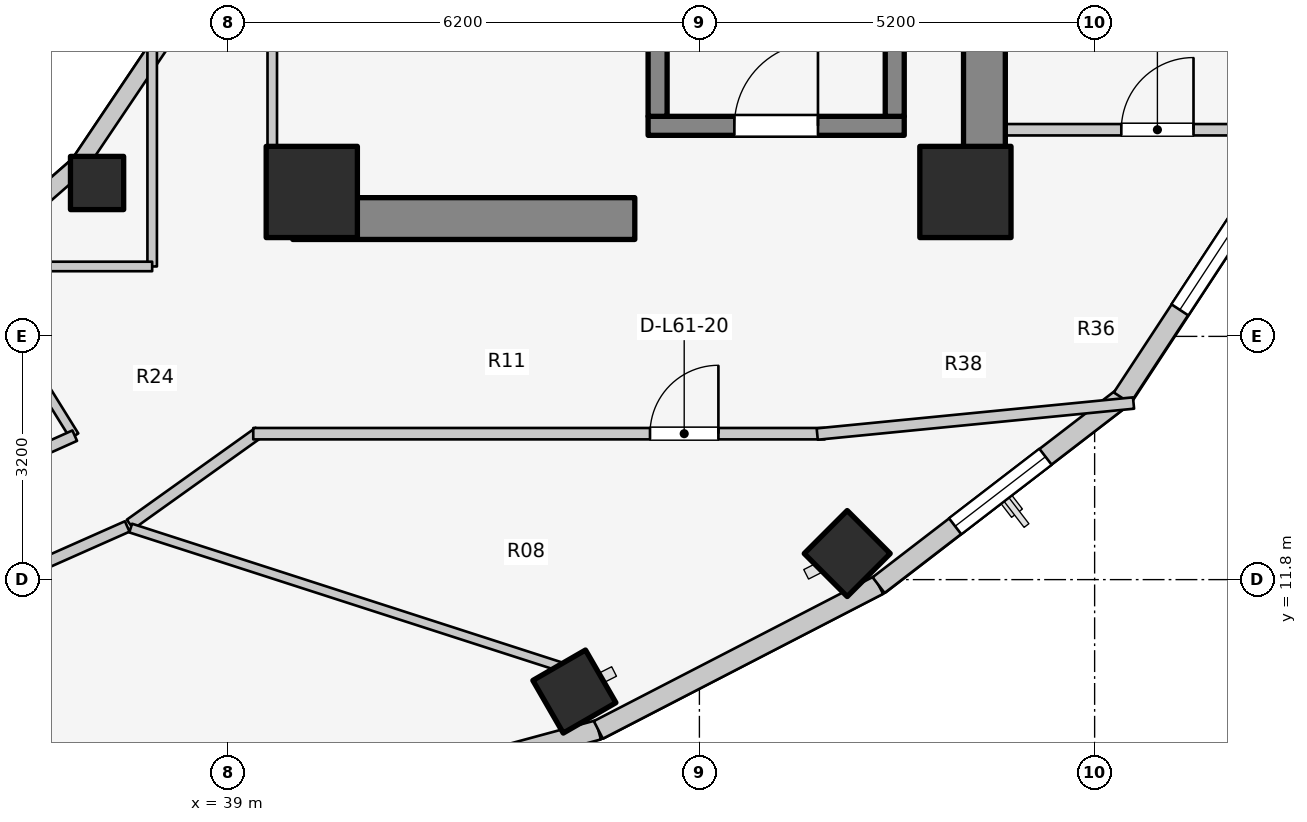
"""IFC4 building model, lengths in metres.
Left out: names, types, materials, properties, quantities, classifications, styles, units other than length and angle.
Written with IfcOpenShell. Run it as: python <this file> out.ifc"""

import sys

from ifc_helpers import new_model, si_unit, direction, frame, frame_2d, origin, origin_2d, place, context, subcontext, project, spatial, rectangle, extrude, element, fill, save


model = new_model("IFC4")
c1 = context("Model", 3, precision=1e-05, world=origin(), true_north=direction((0.0, 1.0)))
c2 = subcontext(c1, "Body", "Model", "MODEL_VIEW")
j1 = project(units=[si_unit("LENGTHUNIT", "METRE"), si_unit("PLANEANGLEUNIT", "RADIAN")], contexts=[c1])
p1 = place(None, origin())
s1 = spatial("IfcSite", under=j1, at=p1, CompositionType="ELEMENT")
p2 = place(p1, origin())
s2 = spatial("IfcBuilding", under=s1, at=p2, CompositionType="ELEMENT")
p3 = place(p2, frame((0.0, 0.0, 201.6)))
s3 = spatial("IfcBuildingStorey", under=s2, at=p3, CompositionType="ELEMENT", Elevation=201.6)
p4 = place(p3, frame((48.95, 17.05, 0.0), z_axis=(0.0, 0.0, 1.0), x_axis=(0.0, 1.0, 0.0)))
e1 = element("IfcWall", 1, at=p4, inside=s3, PredefinedType="SHEAR", context=c2, shape_type="SweptSolid", body=[
    extrude(rectangle(XDim=12.8, YDim=0.55, at=frame_2d((6.4, 0.0))), origin(), (0.0, 0.0, 1.0), 3.1),
])
p5 = place(p3, frame((39.85, 16.55, 0.0), z_axis=(0.0, 0.0, 1.0), x_axis=(1.0, 0.0, 0.0)))
e2 = element("IfcWall", 2, at=p5, inside=s3, PredefinedType="SHEAR", context=c2, shape_type="SweptSolid", body=[
    extrude(rectangle(XDim=4.5, YDim=0.55, at=frame_2d((2.25, 0.0))), origin(), (0.0, 0.0, 1.0), 3.1),
])
p6 = place(p3, frame((44.525, 17.77, 0.0), z_axis=(0.0, 0.0, 1.0), x_axis=(1.0, 0.0, 0.0)))
e3 = element("IfcWall", 3, at=p6, inside=s3, PredefinedType="SOLIDWALL", context=c2, shape_type="SweptSolid", body=[
    extrude(rectangle(XDim=3.37, YDim=0.25, at=frame_2d((1.685, 0.0))), origin(), (0.0, 0.0, 1.0), 3.1),
])
p7 = place(p6, frame((1.135, 0.0, 0.0)))
e4 = element("IfcOpeningElement", 4, at=p7, cuts=e3, PredefinedType="OPENING", context=c2, shape_type="SweptSolid", body=[
    extrude(rectangle(XDim=1.1, YDim=2.1, at=frame_2d((0.55, 1.05))), frame((0.0, 0.135, 0.0), z_axis=(0.0, -1.0, 0.0), x_axis=(1.0, 0.0, 0.0)), (0.0, 0.0, 1.0), 0.27),
])
for number, where, z_axis, x_axis in (
    (5, (44.65, 17.895, 0.0), (0.0, 0.0, 1.0), (0.0, 1.0, 0.0)),
    (6, (47.77, 17.895, 0.0), (0.0, 0.0, 1.0), (0.0, 1.0, 0.0)),
):
    element("IfcWall", number, at=place(p3, frame(where, z_axis=z_axis, x_axis=x_axis)), inside=s3, PredefinedType="SOLIDWALL", context=c2, shape_type="SweptSolid", body=[
        extrude(rectangle(XDim=7.81, YDim=0.25, at=frame_2d((3.905, 0.0))), origin(), (0.0, 0.0, 1.0), 3.1),
    ])
for number, where, z_axis, x_axis in (
    (7, (40.1, 16.9, 0.0), (0.0, 0.0, 1.0), (1.0, 0.0, 0.0)),
    (8, (48.7, 16.9, 0.0), (0.0, 0.0, 1.0), (1.0, 0.0, 0.0)),
):
    element("IfcColumn", number, at=place(p3, frame(where, z_axis=z_axis, x_axis=x_axis)), inside=s3, PredefinedType="COLUMN", context=c2, shape_type="SweptSolid", body=[
        extrude(rectangle(XDim=1.2, YDim=1.2, at=origin_2d()), origin(), (0.0, 0.0, 1.0), 3.1),
    ])
p8 = place(p3, frame((43.555, 10.327, 0.0), z_axis=(0.0, 0.0, 1.0), x_axis=(0.5, -0.866025403784, 0.0)))
e9 = element("IfcColumn", 9, at=p8, inside=s3, PredefinedType="COLUMN", context=c2, shape_type="SweptSolid", body=[
    extrude(rectangle(XDim=0.8, YDim=0.8, at=origin_2d()), origin(), (0.0, 0.0, 1.0), 3.1),
])
p9 = place(p3, frame((37.275, 17.018, 0.0), z_axis=(0.0, 0.0, 1.0), x_axis=(1.0, 0.0, 0.0)))
e10 = element("IfcColumn", 10, at=p9, inside=s3, PredefinedType="COLUMN", context=c2, shape_type="SweptSolid", body=[
    extrude(rectangle(XDim=0.7, YDim=0.7, at=origin_2d()), origin(), (0.0, 0.0, 1.0), 3.1),
])
p10 = place(p3, frame((47.145, 12.143, 0.0), z_axis=(0.0, 0.0, 1.0), x_axis=(0.707106781187, -0.707106781187, 0.0)))
e11 = element("IfcColumn", 11, at=p10, inside=s3, PredefinedType="COLUMN", context=c2, shape_type="SweptSolid", body=[
    extrude(rectangle(XDim=0.8, YDim=0.8, at=origin_2d()), origin(), (0.0, 0.0, 1.0), 3.1),
])
p11 = place(p3, frame((35.56, 15.968, 0.0), z_axis=(0.0, 0.0, 1.0), x_axis=(0.752576694707, 0.658504607869, 0.0)))
e12 = element("IfcWall", 12, at=p11, inside=s3, PredefinedType="STANDARD", context=c2, shape_type="SweptSolid", body=[
    extrude(rectangle(XDim=1.959, YDim=0.23, at=frame_2d((0.98, 0.0))), origin(), (0.0, 0.0, 1.0), 2.16),
])
p12 = place(p3, frame((37.035, 17.258, 0.0), z_axis=(0.0, 0.0, 1.0), x_axis=(0.558197800898, 0.829707909492, 0.0)))
e13 = element("IfcWall", 13, at=p12, inside=s3, PredefinedType="STANDARD", context=c2, shape_type="SweptSolid", body=[
    extrude(rectangle(XDim=2.027, YDim=0.23, at=frame_2d((1.013, 0.0))), origin(), (0.0, 0.0, 1.0), 2.16),
])
p13 = place(p3, frame((39.043, 8.515, 0.0), z_axis=(0.0, 0.0, 1.0), x_axis=(0.965213026382, 0.261464746576, 0.0)))
e14 = element("IfcWall", 14, at=p13, inside=s3, PredefinedType="STANDARD", context=c2, shape_type="SweptSolid", body=[
    extrude(rectangle(XDim=5.001, YDim=0.26, at=frame_2d((2.5, 0.0))), origin(), (0.0, 0.0, 1.0), 2.85),
])
p14 = place(p13, frame((1.75, 0.0, 0.75)))
e15 = element("IfcOpeningElement", 15, at=p14, cuts=e14, PredefinedType="OPENING", context=c2, shape_type="SweptSolid", body=[
    extrude(rectangle(XDim=1.5, YDim=1.6, at=frame_2d((0.75, 0.8))), frame((0.0, 0.14, 0.0), z_axis=(0.0, -1.0, 0.0), x_axis=(1.0, 0.0, 0.0)), (0.0, 0.0, 1.0), 0.28),
])
p15 = place(p3, frame((43.87, 9.823, 0.0), z_axis=(0.0, 0.0, 1.0), x_axis=(0.88849146803, 0.458893137057, 0.0)))
e16 = element("IfcWall", 16, at=p15, inside=s3, PredefinedType="STANDARD", context=c2, shape_type="SweptSolid", body=[
    extrude(rectangle(XDim=4.15, YDim=0.26, at=frame_2d((2.075, 0.0))), origin(), (0.0, 0.0, 1.0), 2.85),
])
p16 = place(p3, frame((47.558, 11.728, 0.0), z_axis=(0.0, 0.0, 1.0), x_axis=(0.792713817907, 0.609593965603, 0.0)))
e17 = element("IfcWall", 17, at=p16, inside=s3, PredefinedType="STANDARD", context=c2, shape_type="SweptSolid", body=[
    extrude(rectangle(XDim=4.041, YDim=0.26, at=frame_2d((2.021, 0.0))), origin(), (0.0, 0.0, 1.0), 2.85),
])
p17 = place(p16, frame((1.271, 0.0, 0.75)))
e18 = element("IfcOpeningElement", 18, at=p17, cuts=e17, PredefinedType="OPENING", context=c2, shape_type="SweptSolid", body=[
    extrude(rectangle(XDim=1.5, YDim=1.6, at=frame_2d((0.75, 0.8))), frame((0.0, 0.14, 0.0), z_axis=(0.0, -1.0, 0.0), x_axis=(1.0, 0.0, 0.0)), (0.0, 0.0, 1.0), 0.28),
])
p18 = place(p3, frame((50.761, 14.191, 0.0), z_axis=(0.0, 0.0, 1.0), x_axis=(0.548776305075, 0.835969238064, 0.0)))
e19 = element("IfcWall", 19, at=p18, inside=s3, PredefinedType="STANDARD", context=c2, shape_type="SweptSolid", body=[
    extrude(rectangle(XDim=4.271, YDim=0.26, at=frame_2d((2.135, 0.0))), origin(), (0.0, 0.0, 1.0), 2.85),
])
p19 = place(p18, frame((1.385, 0.0, 0.75)))
e20 = element("IfcOpeningElement", 20, at=p19, cuts=e19, PredefinedType="OPENING", context=c2, shape_type="SweptSolid", body=[
    extrude(rectangle(XDim=1.5, YDim=1.6, at=frame_2d((0.75, 0.8))), frame((0.0, 0.14, 0.0), z_axis=(0.0, -1.0, 0.0), x_axis=(1.0, 0.0, 0.0)), (0.0, 0.0, 1.0), 0.28),
])
p20 = place(p3, frame((39.58, 17.1, 0.0), z_axis=(0.0, 0.0, 1.0), x_axis=(0.0, 1.0, 0.0)))
e21 = element("IfcWall", 21, at=p20, inside=s3, PredefinedType="PARTITIONING", context=c2, shape_type="SweptSolid", body=[
    extrude(rectangle(XDim=2.04, YDim=0.125, at=frame_2d((1.02, 0.0))), origin(), (0.0, 0.0, 1.0), 2.232),
])
p21 = place(p3, frame((35.55, 15.985, 0.0), z_axis=(0.0, 0.0, 1.0), x_axis=(0.527527080983, -0.849538215049, 0.0)))
e22 = element("IfcWall", 22, at=p21, inside=s3, PredefinedType="PARTITIONING", context=c2, shape_type="SweptSolid", body=[
    extrude(rectangle(XDim=2.701, YDim=0.125, at=frame_2d((1.351, 0.0))), origin(), (0.0, 0.0, 1.0), 2.376),
])
p22 = place(p3, frame((34.573, 12.616, 0.0), z_axis=(0.0, 0.0, 1.0), x_axis=(0.912628408652, 0.408790151203, 0.0)))
e23 = element("IfcWall", 23, at=p22, inside=s3, PredefinedType="PARTITIONING", context=c2, shape_type="SweptSolid", body=[
    extrude(rectangle(XDim=2.638, YDim=0.15, at=frame_2d((1.319, 0.0))), origin(), (0.0, 0.0, 1.0), 2.376),
])
p23 = place(p22, frame((0.844, 0.0, 0.0)))
e24 = element("IfcOpeningElement", 24, at=p23, cuts=e23, PredefinedType="OPENING", context=c2, shape_type="SweptSolid", body=[
    extrude(rectangle(XDim=0.95, YDim=2.1, at=frame_2d((0.475, 1.05))), frame((0.0, 0.085, 0.0), z_axis=(0.0, -1.0, 0.0), x_axis=(1.0, 0.0, 0.0)), (0.0, 0.0, 1.0), 0.17),
])
p24 = place(p3, frame((38.0, 15.92, 0.0), z_axis=(0.0, 0.0, 1.0), x_axis=(0.0, 1.0, 0.0)))
e25 = element("IfcWall", 25, at=p24, inside=s3, PredefinedType="PARTITIONING", context=c2, shape_type="SweptSolid", body=[
    extrude(rectangle(XDim=4.28, YDim=0.125, at=frame_2d((2.14, 0.0))), origin(), (0.0, 0.0, 1.0), 2.232),
])
p25 = place(p3, frame((35.4, 15.92, 0.0), z_axis=(0.0, 0.0, 1.0), x_axis=(1.0, 0.0, 0.0)))
e26 = element("IfcWall", 26, at=p25, inside=s3, PredefinedType="PARTITIONING", context=c2, shape_type="SweptSolid", body=[
    extrude(rectangle(XDim=2.6, YDim=0.125, at=frame_2d((1.3, 0.0))), origin(), (0.0, 0.0, 1.0), 2.232),
])
p26 = place(p3, frame((48.95, 17.719, 0.0), z_axis=(0.0, 0.0, 1.0), x_axis=(1.0, 0.0, 0.0)))
e27 = element("IfcWall", 27, at=p26, inside=s3, PredefinedType="PARTITIONING", context=c2, shape_type="SweptSolid", body=[
    extrude(rectangle(XDim=4.32, YDim=0.15, at=frame_2d((2.16, 0.0))), origin(), (0.0, 0.0, 1.0), 2.855),
])
p27 = place(p26, frame((1.801, 0.0, 0.0)))
e28 = element("IfcOpeningElement", 28, at=p27, cuts=e27, PredefinedType="OPENING", context=c2, shape_type="SweptSolid", body=[
    extrude(rectangle(XDim=0.95, YDim=2.1, at=frame_2d((0.475, 1.05))), frame((0.0, 0.085, 0.0), z_axis=(0.0, -1.0, 0.0), x_axis=(1.0, 0.0, 0.0)), (0.0, 0.0, 1.0), 0.17),
])
p28 = place(p3, frame((37.71, 12.527, 0.0), z_axis=(0.0, 0.0, 1.0), x_axis=(0.813780999276, 0.581171648669, 0.0)))
e29 = element("IfcWall", 29, at=p28, inside=s3, PredefinedType="PARTITIONING", context=c2, shape_type="SweptSolid", body=[
    extrude(rectangle(XDim=2.082, YDim=0.15, at=frame_2d((1.041, 0.0))), origin(), (0.0, 0.0, 1.0), 2.376),
])
p29 = place(p3, frame((39.33, 13.72, 0.0), z_axis=(0.0, 0.0, 1.0), x_axis=(1.0, 0.0, 0.0)))
e30 = element("IfcWall", 30, at=p29, inside=s3, PredefinedType="PARTITIONING", context=c2, shape_type="SweptSolid", body=[
    extrude(rectangle(XDim=7.52, YDim=0.15, at=frame_2d((3.76, 0.0))), origin(), (0.0, 0.0, 1.0), 2.376),
])
p30 = place(p29, frame((5.22, 0.0, 0.0)))
e31 = element("IfcOpeningElement", 31, at=p30, cuts=e30, PredefinedType="OPENING", context=c2, shape_type="SweptSolid", body=[
    extrude(rectangle(XDim=0.9, YDim=2.1, at=frame_2d((0.45, 1.05))), frame((0.0, 0.085, 0.0), z_axis=(0.0, -1.0, 0.0), x_axis=(1.0, 0.0, 0.0)), (0.0, 0.0, 1.0), 0.17),
])
p31 = place(p3, frame((46.75, 13.715, 0.0), z_axis=(0.0, 0.0, 1.0), x_axis=(0.995223854991, 0.097619047609, 0.0)))
e32 = element("IfcWall", 32, at=p31, inside=s3, PredefinedType="PARTITIONING", context=c2, shape_type="SweptSolid", body=[
    extrude(rectangle(XDim=4.182, YDim=0.15, at=frame_2d((2.091, 0.0))), origin(), (0.0, 0.0, 1.0), 2.22),
])
p32 = place(p3, frame((37.717, 12.478, 0.0), z_axis=(0.0, 0.0, 1.0), x_axis=(0.951711719757, -0.306993163568, 0.0)))
e33 = element("IfcWall", 33, at=p32, inside=s3, PredefinedType="MOVABLE", context=c2, shape_type="SweptSolid", body=[
    extrude(rectangle(XDim=5.934, YDim=0.12, at=frame_2d((2.967, 0.0))), origin(), (0.0, 0.0, 1.0), 2.376),
])
p33 = place(p3, frame((34.93, 11.283, 0.0), z_axis=(0.0, 0.0, 1.0), x_axis=(0.914043013008, 0.4056172708, 0.0)))
e34 = element("IfcWall", 34, at=p33, inside=s3, PredefinedType="PARTITIONING", context=c2, shape_type="SweptSolid", body=[
    extrude(rectangle(XDim=2.999, YDim=0.15, at=frame_2d((1.5, 0.0))), origin(), (0.0, 0.0, 1.0), 2.376),
])
p34 = place(p17, origin())
e35 = element("IfcWindow", 35, at=p34, inside=s3, PartitioningType="SINGLE_PANEL", PredefinedType="WINDOW", context=c2, shape_type="SweptSolid", body=[
    extrude(rectangle(XDim=1.5, YDim=1.6, at=frame_2d((0.75, 0.8))), frame((0.0, 0.03, 0.0), z_axis=(0.0, -1.0, 0.0), x_axis=(1.0, 0.0, 0.0)), (0.0, 0.0, 1.0), 0.06),
])
fill(e18, e35)
p35 = place(p19, origin())
e36 = element("IfcWindow", 36, at=p35, inside=s3, PartitioningType="SINGLE_PANEL", PredefinedType="WINDOW", context=c2, shape_type="SweptSolid", body=[
    extrude(rectangle(XDim=1.5, YDim=1.6, at=frame_2d((0.75, 0.8))), frame((0.0, 0.03, 0.0), z_axis=(0.0, -1.0, 0.0), x_axis=(1.0, 0.0, 0.0)), (0.0, 0.0, 1.0), 0.06),
])
fill(e20, e36)
p36 = place(p7, origin())
e37 = element("IfcDoor", 37, at=p36, inside=s3, OperationType="SINGLE_SWING_RIGHT", PredefinedType="DOOR", context=c2, shape_type="SweptSolid", body=[
    extrude(rectangle(XDim=1.1, YDim=2.1, at=frame_2d((0.55, 1.05))), frame((0.0, 0.025, 0.0), z_axis=(0.0, -1.0, 0.0), x_axis=(1.0, 0.0, 0.0)), (0.0, 0.0, 1.0), 0.05),
])
fill(e4, e37)
p37 = place(p27, origin())
e38 = element("IfcDoor", 38, at=p37, inside=s3, OperationType="SINGLE_SWING_RIGHT", PredefinedType="DOOR", context=c2, shape_type="SweptSolid", body=[
    extrude(rectangle(XDim=0.95, YDim=2.1, at=frame_2d((0.475, 1.05))), frame((0.0, 0.025, 0.0), z_axis=(0.0, -1.0, 0.0), x_axis=(1.0, 0.0, 0.0)), (0.0, 0.0, 1.0), 0.05),
])
fill(e28, e38)
p38 = place(p30, origin())
e39 = element("IfcDoor", 39, at=p38, inside=s3, OperationType="SINGLE_SWING_RIGHT", PredefinedType="DOOR", context=c2, shape_type="SweptSolid", body=[
    extrude(rectangle(XDim=0.9, YDim=2.1, at=frame_2d((0.45, 1.05))), frame((0.0, 0.025, 0.0), z_axis=(0.0, -1.0, 0.0), x_axis=(1.0, 0.0, 0.0)), (0.0, 0.0, 1.0), 0.05),
])
fill(e31, e39)
save(model, sys.argv[1])
